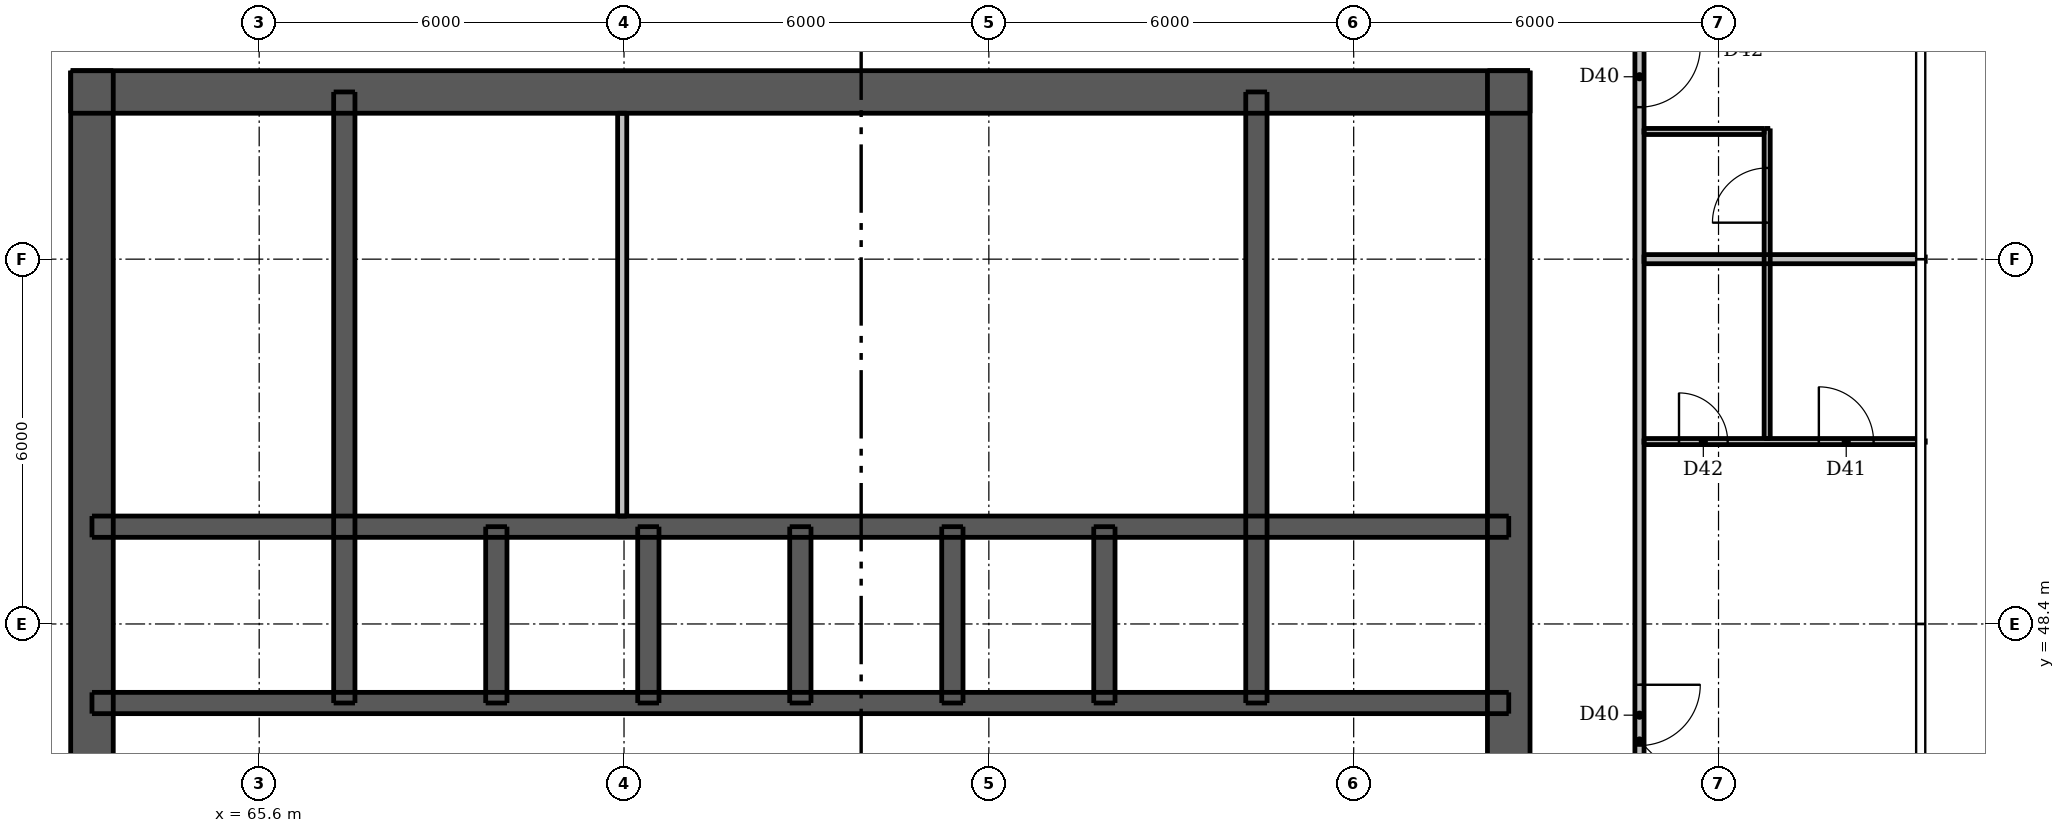
"""IFC4 building model, lengths in metres.
Left out: names, types, materials, properties, quantities, classifications, styles, units other than length and angle.
Written with IfcOpenShell. Run it as: python <this file> out.ifc"""

import sys

from ifc_helpers import new_model, si_unit, direction, frame, frame_2d, origin, place, context, subcontext, project, spatial, rectangle, extrude, element, fill, save


model = new_model("IFC4")
c1 = context("Model", 3, precision=1e-05, world=origin(), true_north=direction((0.0, 1.0)))
c2 = subcontext(c1, "Body", "Model", "MODEL_VIEW")
j1 = project(units=[si_unit("LENGTHUNIT", "METRE"), si_unit("PLANEANGLEUNIT", "RADIAN")], contexts=[c1])
p1 = place(None, origin())
s1 = spatial("IfcSite", under=j1, at=p1, CompositionType="ELEMENT")
p2 = place(p1, origin())
s2 = spatial("IfcBuilding", under=s1, at=p2, CompositionType="ELEMENT")
p3 = place(p2, frame((0.0, 0.0, 168.1)))
s3 = spatial("IfcBuildingStorey", under=s2, at=p3, CompositionType="ELEMENT", Elevation=168.1)
p4 = place(p3, frame((62.5, 57.15, 0.0), z_axis=(0.0, 0.0, 1.0), x_axis=(1.0, 0.0, 0.0)))
e1 = element("IfcWall", 1, at=p4, inside=s3, PredefinedType="SHEAR", context=c2, shape_type="SweptSolid", body=[
    extrude(rectangle(XDim=24.0, YDim=0.7, at=frame_2d((12.0, 0.0))), origin(), (0.0, 0.0, 1.0), 3.05),
])
p5 = place(p4, frame((20.938, 0.0, 0.0)))
e2 = element("IfcOpeningElement", 2, at=p5, cuts=e1, PredefinedType="OPENING", context=c2, shape_type="SweptSolid", body=[
    extrude(rectangle(XDim=1.1, YDim=2.1, at=frame_2d((0.55, 1.05))), frame((0.0, 0.36, 0.0), z_axis=(0.0, -1.0, 0.0), x_axis=(1.0, 0.0, 0.0)), (0.0, 0.0, 1.0), 0.72),
])
p6 = place(p4, frame((1.962, 0.0, 0.0)))
e3 = element("IfcOpeningElement", 3, at=p6, cuts=e1, PredefinedType="OPENING", context=c2, shape_type="SweptSolid", body=[
    extrude(rectangle(XDim=1.1, YDim=2.1, at=frame_2d((0.55, 1.05))), frame((0.0, 0.36, 0.0), z_axis=(0.0, -1.0, 0.0), x_axis=(1.0, 0.0, 0.0)), (0.0, 0.0, 1.0), 0.72),
])
p7 = place(p4, frame((6.423, 0.0, 0.0)))
e4 = element("IfcOpeningElement", 4, at=p7, cuts=e1, PredefinedType="OPENING", context=c2, shape_type="SweptSolid", body=[
    extrude(rectangle(XDim=0.9, YDim=2.1, at=frame_2d((0.45, 1.05))), frame((0.0, 0.36, 0.0), z_axis=(0.0, -1.0, 0.0), x_axis=(1.0, 0.0, 0.0)), (0.0, 0.0, 1.0), 0.72),
])
p8 = place(p4, frame((13.748, 0.0, 0.0)))
e5 = element("IfcOpeningElement", 5, at=p8, cuts=e1, PredefinedType="OPENING", context=c2, shape_type="SweptSolid", body=[
    extrude(rectangle(XDim=0.9, YDim=2.1, at=frame_2d((0.45, 1.05))), frame((0.0, 0.36, 0.0), z_axis=(0.0, -1.0, 0.0), x_axis=(1.0, 0.0, 0.0)), (0.0, 0.0, 1.0), 0.72),
])
p9 = place(p3, frame((62.85, 33.5, 0.0), z_axis=(0.0, 0.0, 1.0), x_axis=(0.0, 1.0, 0.0)))
e6 = element("IfcWall", 6, at=p9, inside=s3, PredefinedType="SHEAR", context=c2, shape_type="SweptSolid", body=[
    extrude(rectangle(XDim=24.0, YDim=0.7, at=frame_2d((12.0, 0.0))), origin(), (0.0, 0.0, 1.0), 3.05),
])
p10 = place(p9, frame((11.2, 0.0, 0.0)))
e7 = element("IfcOpeningElement", 7, at=p10, cuts=e6, PredefinedType="OPENING", context=c2, shape_type="SweptSolid", body=[
    extrude(rectangle(XDim=1.6, YDim=2.1, at=frame_2d((0.8, 1.05))), frame((0.0, 0.36, 0.0), z_axis=(0.0, -1.0, 0.0), x_axis=(1.0, 0.0, 0.0)), (0.0, 0.0, 1.0), 0.72),
])
p11 = place(p3, frame((86.15, 33.5, 0.0), z_axis=(0.0, 0.0, 1.0), x_axis=(0.0, 1.0, 0.0)))
e8 = element("IfcWall", 8, at=p11, inside=s3, PredefinedType="SHEAR", context=c2, shape_type="SweptSolid", body=[
    extrude(rectangle(XDim=24.0, YDim=0.7, at=frame_2d((12.0, 0.0))), origin(), (0.0, 0.0, 1.0), 3.05),
])
p12 = place(p11, frame((11.2, 0.0, 0.0)))
e9 = element("IfcOpeningElement", 9, at=p12, cuts=e8, PredefinedType="OPENING", context=c2, shape_type="SweptSolid", body=[
    extrude(rectangle(XDim=1.6, YDim=2.1, at=frame_2d((0.8, 1.05))), frame((0.0, 0.36, 0.0), z_axis=(0.0, -1.0, 0.0), x_axis=(1.0, 0.0, 0.0)), (0.0, 0.0, 1.0), 0.72),
])
p13 = place(p3, frame((62.85, 47.1, 0.0), z_axis=(0.0, 0.0, 1.0), x_axis=(1.0, 0.0, 0.0)))
e10 = element("IfcWall", 10, at=p13, inside=s3, PredefinedType="SHEAR", context=c2, shape_type="SweptSolid", body=[
    extrude(rectangle(XDim=23.3, YDim=0.35, at=frame_2d((11.65, 0.0))), origin(), (0.0, 0.0, 1.0), 3.05),
])
p14 = place(p13, frame((1.712, 0.0, 0.0)))
e11 = element("IfcOpeningElement", 11, at=p14, cuts=e10, PredefinedType="OPENING", context=c2, shape_type="SweptSolid", body=[
    extrude(rectangle(XDim=0.9, YDim=2.1, at=frame_2d((0.45, 1.05))), frame((0.0, 0.185, 0.0), z_axis=(0.0, -1.0, 0.0), x_axis=(1.0, 0.0, 0.0)), (0.0, 0.0, 1.0), 0.37),
])
p15 = place(p13, frame((20.688, 0.0, 0.0)))
e12 = element("IfcOpeningElement", 12, at=p15, cuts=e10, PredefinedType="OPENING", context=c2, shape_type="SweptSolid", body=[
    extrude(rectangle(XDim=0.9, YDim=2.1, at=frame_2d((0.45, 1.05))), frame((0.0, 0.185, 0.0), z_axis=(0.0, -1.0, 0.0), x_axis=(1.0, 0.0, 0.0)), (0.0, 0.0, 1.0), 0.37),
])
p16 = place(p13, frame((4.85, 0.0, 0.0)))
e13 = element("IfcOpeningElement", 13, at=p16, cuts=e10, PredefinedType="OPENING", context=c2, shape_type="SweptSolid", body=[
    extrude(rectangle(XDim=1.1, YDim=2.1, at=frame_2d((0.55, 1.05))), frame((0.0, 0.185, 0.0), z_axis=(0.0, -1.0, 0.0), x_axis=(1.0, 0.0, 0.0)), (0.0, 0.0, 1.0), 0.37),
])
p17 = place(p13, frame((7.35, 0.0, 0.0)))
e14 = element("IfcOpeningElement", 14, at=p17, cuts=e10, PredefinedType="OPENING", context=c2, shape_type="SweptSolid", body=[
    extrude(rectangle(XDim=1.1, YDim=2.1, at=frame_2d((0.55, 1.05))), frame((0.0, 0.185, 0.0), z_axis=(0.0, -1.0, 0.0), x_axis=(1.0, 0.0, 0.0)), (0.0, 0.0, 1.0), 0.37),
])
p18 = place(p13, frame((9.85, 0.0, 0.0)))
e15 = element("IfcOpeningElement", 15, at=p18, cuts=e10, PredefinedType="OPENING", context=c2, shape_type="SweptSolid", body=[
    extrude(rectangle(XDim=1.1, YDim=2.1, at=frame_2d((0.55, 1.05))), frame((0.0, 0.185, 0.0), z_axis=(0.0, -1.0, 0.0), x_axis=(1.0, 0.0, 0.0)), (0.0, 0.0, 1.0), 0.37),
])
p19 = place(p13, frame((12.35, 0.0, 0.0)))
e16 = element("IfcOpeningElement", 16, at=p19, cuts=e10, PredefinedType="OPENING", context=c2, shape_type="SweptSolid", body=[
    extrude(rectangle(XDim=1.1, YDim=2.1, at=frame_2d((0.55, 1.05))), frame((0.0, 0.185, 0.0), z_axis=(0.0, -1.0, 0.0), x_axis=(1.0, 0.0, 0.0)), (0.0, 0.0, 1.0), 0.37),
])
p20 = place(p13, frame((14.85, 0.0, 0.0)))
e17 = element("IfcOpeningElement", 17, at=p20, cuts=e10, PredefinedType="OPENING", context=c2, shape_type="SweptSolid", body=[
    extrude(rectangle(XDim=1.1, YDim=2.1, at=frame_2d((0.55, 1.05))), frame((0.0, 0.185, 0.0), z_axis=(0.0, -1.0, 0.0), x_axis=(1.0, 0.0, 0.0)), (0.0, 0.0, 1.0), 0.37),
])
p21 = place(p13, frame((17.35, 0.0, 0.0)))
e18 = element("IfcOpeningElement", 18, at=p21, cuts=e10, PredefinedType="OPENING", context=c2, shape_type="SweptSolid", body=[
    extrude(rectangle(XDim=1.1, YDim=2.1, at=frame_2d((0.55, 1.05))), frame((0.0, 0.185, 0.0), z_axis=(0.0, -1.0, 0.0), x_axis=(1.0, 0.0, 0.0)), (0.0, 0.0, 1.0), 0.37),
])
p22 = place(p3, frame((62.85, 50.0, 0.0), z_axis=(0.0, 0.0, 1.0), x_axis=(1.0, 0.0, 0.0)))
e19 = element("IfcWall", 19, at=p22, inside=s3, PredefinedType="SHEAR", context=c2, shape_type="SweptSolid", body=[
    extrude(rectangle(XDim=23.3, YDim=0.35, at=frame_2d((11.65, 0.0))), origin(), (0.0, 0.0, 1.0), 3.05),
])
for number, where, z_axis, x_axis in (
    (20, (67.0, 47.1, 0.0), (0.0, 0.0, 1.0), (0.0, 1.0, 0.0)),
    (21, (82.0, 47.1, 0.0), (0.0, 0.0, 1.0), (0.0, 1.0, 0.0)),
):
    element("IfcWall", number, at=place(p3, frame(where, z_axis=z_axis, x_axis=x_axis)), inside=s3, PredefinedType="SHEAR", context=c2, shape_type="SweptSolid", body=[
        extrude(rectangle(XDim=10.05, YDim=0.35, at=frame_2d((5.025, 0.0))), origin(), (0.0, 0.0, 1.0), 3.05),
    ])
for number, where, z_axis, x_axis in (
    (22, (69.5, 47.1, 0.0), (0.0, 0.0, 1.0), (0.0, 1.0, 0.0)),
    (23, (72.0, 47.1, 0.0), (0.0, 0.0, 1.0), (0.0, 1.0, 0.0)),
    (24, (74.5, 47.1, 0.0), (0.0, 0.0, 1.0), (0.0, 1.0, 0.0)),
    (25, (77.0, 47.1, 0.0), (0.0, 0.0, 1.0), (0.0, 1.0, 0.0)),
    (26, (79.5, 47.1, 0.0), (0.0, 0.0, 1.0), (0.0, 1.0, 0.0)),
):
    element("IfcWall", number, at=place(p3, frame(where, z_axis=z_axis, x_axis=x_axis)), inside=s3, PredefinedType="SHEAR", context=c2, shape_type="SweptSolid", body=[
        extrude(rectangle(XDim=2.9, YDim=0.35, at=frame_2d((1.45, 0.0))), origin(), (0.0, 0.0, 1.0), 3.05),
    ])
p23 = place(p3, frame((71.57, 50.175, 0.0), z_axis=(0.0, 0.0, 1.0), x_axis=(0.0, 1.0, 0.0)))
e27 = element("IfcWall", 27, at=p23, inside=s3, PredefinedType="PLUMBINGWALL", context=c2, shape_type="SweptSolid", body=[
    extrude(rectangle(XDim=6.625, YDim=0.15, at=frame_2d((3.312, 0.0))), origin(), (0.0, 0.0, 1.0), 3.05),
])
p24 = place(p3, frame((90.4, 51.45, 0.0), z_axis=(0.0, 0.0, 1.0), x_axis=(0.0, 1.0, 0.0)))
e28 = element("IfcWall", 28, at=p24, inside=s3, PredefinedType="PARTITIONING", context=c2, shape_type="SweptSolid", body=[
    extrude(rectangle(XDim=5.1, YDim=0.1, at=frame_2d((2.55, 0.0))), origin(), (0.0, 0.0, 1.0), 3.05),
])
p25 = place(p24, frame((3.55, 0.0, 0.0)))
e29 = element("IfcOpeningElement", 29, at=p25, cuts=e28, PredefinedType="OPENING", context=c2, shape_type="SweptSolid", body=[
    extrude(rectangle(XDim=0.9, YDim=2.1, at=frame_2d((0.45, 1.05))), frame((0.0, 0.06, 0.0), z_axis=(0.0, -1.0, 0.0), x_axis=(1.0, 0.0, 0.0)), (0.0, 0.0, 1.0), 0.12),
])
p26 = place(p3, frame((88.375, 56.5, 0.0), z_axis=(0.0, 0.0, 1.0), x_axis=(1.0, 0.0, 0.0)))
e30 = element("IfcWall", 30, at=p26, inside=s3, PredefinedType="PARTITIONING", context=c2, shape_type="SweptSolid", body=[
    extrude(rectangle(XDim=1.975, YDim=0.1, at=frame_2d((0.988, 0.0))), origin(), (0.0, 0.0, 1.0), 3.05),
])
p27 = place(p3, frame((88.375, 51.4, 0.0), z_axis=(0.0, 0.0, 1.0), x_axis=(1.0, 0.0, 0.0)))
e31 = element("IfcWall", 31, at=p27, inside=s3, PredefinedType="PARTITIONING", context=c2, shape_type="SweptSolid", body=[
    extrude(rectangle(XDim=4.625, YDim=0.1, at=frame_2d((2.312, 0.0))), origin(), (0.0, 0.0, 1.0), 3.05),
])
p28 = place(p27, frame((2.875, 0.0, 0.0)))
e32 = element("IfcOpeningElement", 32, at=p28, cuts=e31, PredefinedType="OPENING", context=c2, shape_type="SweptSolid", body=[
    extrude(rectangle(XDim=0.9, YDim=2.1, at=frame_2d((0.45, 1.05))), frame((0.0, 0.06, 0.0), z_axis=(0.0, -1.0, 0.0), x_axis=(1.0, 0.0, 0.0)), (0.0, 0.0, 1.0), 0.12),
])
p29 = place(p27, frame((0.575, 0.0, 0.0)))
e33 = element("IfcOpeningElement", 33, at=p29, cuts=e31, PredefinedType="OPENING", context=c2, shape_type="SweptSolid", body=[
    extrude(rectangle(XDim=0.8, YDim=2.1, at=frame_2d((0.4, 1.05))), frame((0.0, 0.06, 0.0), z_axis=(0.0, -1.0, 0.0), x_axis=(1.0, 0.0, 0.0)), (0.0, 0.0, 1.0), 0.12),
])
p30 = place(p3, frame((88.3, 61.175, 0.0), z_axis=(0.0, 0.0, 1.0), x_axis=(0.0, -1.0, 0.0)))
e34 = element("IfcWall", 34, at=p30, inside=s3, PredefinedType="PARTITIONING", context=c2, shape_type="SweptSolid", body=[
    extrude(rectangle(XDim=29.4, YDim=0.15, at=frame_2d((14.7, 0.0))), origin(), (0.0, 0.0, 1.0), 3.05),
])
p31 = place(p30, frame((28.125, 0.0, 0.0)))
e35 = element("IfcOpeningElement", 35, at=p31, cuts=e34, PredefinedType="OPENING", context=c2, shape_type="SweptSolid", body=[
    extrude(rectangle(XDim=1.0, YDim=2.1, at=frame_2d((0.5, 1.05))), frame((0.0, 0.085, 0.0), z_axis=(0.0, -1.0, 0.0), x_axis=(1.0, 0.0, 0.0)), (0.0, 0.0, 1.0), 0.17),
])
p32 = place(p30, frame((13.775, 0.0, 0.0)))
e36 = element("IfcOpeningElement", 36, at=p32, cuts=e34, PredefinedType="OPENING", context=c2, shape_type="SweptSolid", body=[
    extrude(rectangle(XDim=1.0, YDim=2.1, at=frame_2d((0.5, 1.05))), frame((0.0, 0.085, 0.0), z_axis=(0.0, -1.0, 0.0), x_axis=(1.0, 0.0, 0.0)), (0.0, 0.0, 1.0), 0.17),
])
p33 = place(p30, frame((3.275, 0.0, 0.0)))
e37 = element("IfcOpeningElement", 37, at=p33, cuts=e34, PredefinedType="OPENING", context=c2, shape_type="SweptSolid", body=[
    extrude(rectangle(XDim=1.0, YDim=2.1, at=frame_2d((0.5, 1.05))), frame((0.0, 0.085, 0.0), z_axis=(0.0, -1.0, 0.0), x_axis=(1.0, 0.0, 0.0)), (0.0, 0.0, 1.0), 0.17),
])
p34 = place(p3, frame((88.375, 54.4, 0.0), z_axis=(0.0, 0.0, 1.0), x_axis=(1.0, 0.0, 0.0)))
e38 = element("IfcWall", 38, at=p34, inside=s3, PredefinedType="PARTITIONING", context=c2, shape_type="SweptSolid", body=[
    extrude(rectangle(XDim=4.625, YDim=0.15, at=frame_2d((2.312, 0.0))), origin(), (0.0, 0.0, 1.0), 2.516),
])
p35 = place(p5, origin())
e39 = element("IfcDoor", 39, at=p35, inside=s3, OperationType="SINGLE_SWING_RIGHT", PredefinedType="DOOR", context=c2, shape_type="SweptSolid", body=[
    extrude(rectangle(XDim=1.1, YDim=2.1, at=frame_2d((0.55, 1.05))), frame((0.0, -0.288, 0.0), z_axis=(0.0, -1.0, 0.0), x_axis=(1.0, 0.0, 0.0)), (0.0, 0.0, 1.0), 0.05),
])
fill(e2, e39)
p36 = place(p6, origin())
e40 = element("IfcDoor", 40, at=p36, inside=s3, OperationType="SINGLE_SWING_LEFT", PredefinedType="DOOR", context=c2, shape_type="SweptSolid", body=[
    extrude(rectangle(XDim=1.1, YDim=2.1, at=frame_2d((0.55, 1.05))), frame((0.0, -0.288, 0.0), z_axis=(0.0, -1.0, 0.0), x_axis=(1.0, 0.0, 0.0)), (0.0, 0.0, 1.0), 0.05),
])
fill(e3, e40)
p37 = place(p10, origin())
e41 = element("IfcDoor", 41, at=p37, inside=s3, OperationType="DOUBLE_DOOR_SINGLE_SWING", PredefinedType="DOOR", context=c2, shape_type="SweptSolid", body=[
    extrude(rectangle(XDim=1.6, YDim=2.1, at=frame_2d((0.8, 1.05))), frame((0.0, -0.288, 0.0), z_axis=(0.0, -1.0, 0.0), x_axis=(1.0, 0.0, 0.0)), (0.0, 0.0, 1.0), 0.05),
])
fill(e7, e41)
p38 = place(p12, origin())
e42 = element("IfcDoor", 42, at=p38, inside=s3, OperationType="DOUBLE_DOOR_SINGLE_SWING", PredefinedType="DOOR", context=c2, shape_type="SweptSolid", body=[
    extrude(rectangle(XDim=1.6, YDim=2.1, at=frame_2d((0.8, 1.05))), frame((0.0, 0.337, 0.0), z_axis=(0.0, -1.0, 0.0), x_axis=(1.0, 0.0, 0.0)), (0.0, 0.0, 1.0), 0.05),
])
fill(e9, e42)
p39 = place(p14, origin())
e43 = element("IfcDoor", 43, at=p39, inside=s3, OperationType="SINGLE_SWING_LEFT", PredefinedType="DOOR", context=c2, shape_type="SweptSolid", body=[
    extrude(rectangle(XDim=0.9, YDim=2.1, at=frame_2d((0.45, 1.05))), frame((0.0, 0.163, 0.0), z_axis=(0.0, -1.0, 0.0), x_axis=(1.0, 0.0, 0.0)), (0.0, 0.0, 1.0), 0.05),
])
fill(e11, e43)
p40 = place(p15, origin())
e44 = element("IfcDoor", 44, at=p40, inside=s3, OperationType="SINGLE_SWING_LEFT", PredefinedType="DOOR", context=c2, shape_type="SweptSolid", body=[
    extrude(rectangle(XDim=0.9, YDim=2.1, at=frame_2d((0.45, 1.05))), frame((0.0, 0.163, 0.0), z_axis=(0.0, -1.0, 0.0), x_axis=(1.0, 0.0, 0.0)), (0.0, 0.0, 1.0), 0.05),
])
fill(e12, e44)
p41 = place(p7, origin())
e45 = element("IfcDoor", 45, at=p41, inside=s3, OperationType="SINGLE_SWING_RIGHT", PredefinedType="DOOR", context=c2, shape_type="SweptSolid", body=[
    extrude(rectangle(XDim=0.9, YDim=2.1, at=frame_2d((0.45, 1.05))), frame((0.0, -0.288, 0.0), z_axis=(0.0, -1.0, 0.0), x_axis=(1.0, 0.0, 0.0)), (0.0, 0.0, 1.0), 0.05),
])
fill(e4, e45)
p42 = place(p8, origin())
e46 = element("IfcDoor", 46, at=p42, inside=s3, OperationType="SINGLE_SWING_RIGHT", PredefinedType="DOOR", context=c2, shape_type="SweptSolid", body=[
    extrude(rectangle(XDim=0.9, YDim=2.1, at=frame_2d((0.45, 1.05))), frame((0.0, -0.288, 0.0), z_axis=(0.0, -1.0, 0.0), x_axis=(1.0, 0.0, 0.0)), (0.0, 0.0, 1.0), 0.05),
])
fill(e5, e46)
p43 = place(p16, origin())
e47 = element("IfcDoor", 47, at=p43, inside=s3, OperationType="DOUBLE_DOOR_SLIDING", PredefinedType="DOOR", context=c2, shape_type="SweptSolid", body=[
    extrude(rectangle(XDim=1.1, YDim=2.1, at=frame_2d((0.55, 1.05))), frame((0.0, 0.025, 0.0), z_axis=(0.0, -1.0, 0.0), x_axis=(1.0, 0.0, 0.0)), (0.0, 0.0, 1.0), 0.05),
])
fill(e13, e47)
p44 = place(p17, origin())
e48 = element("IfcDoor", 48, at=p44, inside=s3, OperationType="DOUBLE_DOOR_SLIDING", PredefinedType="DOOR", context=c2, shape_type="SweptSolid", body=[
    extrude(rectangle(XDim=1.1, YDim=2.1, at=frame_2d((0.55, 1.05))), frame((0.0, 0.025, 0.0), z_axis=(0.0, -1.0, 0.0), x_axis=(1.0, 0.0, 0.0)), (0.0, 0.0, 1.0), 0.05),
])
fill(e14, e48)
p45 = place(p18, origin())
e49 = element("IfcDoor", 49, at=p45, inside=s3, OperationType="DOUBLE_DOOR_SLIDING", PredefinedType="DOOR", context=c2, shape_type="SweptSolid", body=[
    extrude(rectangle(XDim=1.1, YDim=2.1, at=frame_2d((0.55, 1.05))), frame((0.0, 0.025, 0.0), z_axis=(0.0, -1.0, 0.0), x_axis=(1.0, 0.0, 0.0)), (0.0, 0.0, 1.0), 0.05),
])
fill(e15, e49)
p46 = place(p19, origin())
e50 = element("IfcDoor", 50, at=p46, inside=s3, OperationType="DOUBLE_DOOR_SLIDING", PredefinedType="DOOR", context=c2, shape_type="SweptSolid", body=[
    extrude(rectangle(XDim=1.1, YDim=2.1, at=frame_2d((0.55, 1.05))), frame((0.0, 0.025, 0.0), z_axis=(0.0, -1.0, 0.0), x_axis=(1.0, 0.0, 0.0)), (0.0, 0.0, 1.0), 0.05),
])
fill(e16, e50)
p47 = place(p20, origin())
e51 = element("IfcDoor", 51, at=p47, inside=s3, OperationType="DOUBLE_DOOR_SLIDING", PredefinedType="DOOR", context=c2, shape_type="SweptSolid", body=[
    extrude(rectangle(XDim=1.1, YDim=2.1, at=frame_2d((0.55, 1.05))), frame((0.0, 0.025, 0.0), z_axis=(0.0, -1.0, 0.0), x_axis=(1.0, 0.0, 0.0)), (0.0, 0.0, 1.0), 0.05),
])
fill(e17, e51)
p48 = place(p21, origin())
e52 = element("IfcDoor", 52, at=p48, inside=s3, OperationType="DOUBLE_DOOR_SLIDING", PredefinedType="DOOR", context=c2, shape_type="SweptSolid", body=[
    extrude(rectangle(XDim=1.1, YDim=2.1, at=frame_2d((0.55, 1.05))), frame((0.0, 0.025, 0.0), z_axis=(0.0, -1.0, 0.0), x_axis=(1.0, 0.0, 0.0)), (0.0, 0.0, 1.0), 0.05),
])
fill(e18, e52)
p49 = place(p32, origin())
e53 = element("IfcDoor", 53, at=p49, inside=s3, OperationType="SINGLE_SWING_LEFT", PredefinedType="DOOR", context=c2, shape_type="SweptSolid", body=[
    extrude(rectangle(XDim=1.0, YDim=2.1, at=frame_2d((0.5, 1.05))), frame((0.0, 0.025, 0.0), z_axis=(0.0, -1.0, 0.0), x_axis=(1.0, 0.0, 0.0)), (0.0, 0.0, 1.0), 0.05),
])
fill(e36, e53)
p50 = place(p28, origin())
e54 = element("IfcDoor", 54, at=p50, inside=s3, OperationType="SINGLE_SWING_LEFT", PredefinedType="DOOR", context=c2, shape_type="SweptSolid", body=[
    extrude(rectangle(XDim=0.9, YDim=2.1, at=frame_2d((0.45, 1.05))), frame((0.0, 0.025, 0.0), z_axis=(0.0, -1.0, 0.0), x_axis=(1.0, 0.0, 0.0)), (0.0, 0.0, 1.0), 0.05),
])
fill(e32, e54)
p51 = place(p29, origin())
e55 = element("IfcDoor", 55, at=p51, inside=s3, OperationType="SINGLE_SWING_LEFT", PredefinedType="DOOR", context=c2, shape_type="SweptSolid", body=[
    extrude(rectangle(XDim=0.8, YDim=2.1, at=frame_2d((0.4, 1.05))), frame((0.0, 0.025, 0.0), z_axis=(0.0, -1.0, 0.0), x_axis=(1.0, 0.0, 0.0)), (0.0, 0.0, 1.0), 0.05),
])
fill(e33, e55)
p52 = place(p33, origin())
e56 = element("IfcDoor", 56, at=p52, inside=s3, OperationType="SINGLE_SWING_LEFT", PredefinedType="DOOR", context=c2, shape_type="SweptSolid", body=[
    extrude(rectangle(XDim=1.0, YDim=2.1, at=frame_2d((0.5, 1.05))), frame((0.0, 0.025, 0.0), z_axis=(0.0, -1.0, 0.0), x_axis=(1.0, 0.0, 0.0)), (0.0, 0.0, 1.0), 0.05),
])
fill(e37, e56)
p53 = place(p25, origin())
e57 = element("IfcDoor", 57, at=p53, inside=s3, OperationType="SINGLE_SWING_LEFT", PredefinedType="DOOR", context=c2, shape_type="SweptSolid", body=[
    extrude(rectangle(XDim=0.9, YDim=2.1, at=frame_2d((0.45, 1.05))), frame((0.0, 0.025, 0.0), z_axis=(0.0, -1.0, 0.0), x_axis=(1.0, 0.0, 0.0)), (0.0, 0.0, 1.0), 0.05),
])
fill(e29, e57)
save(model, sys.argv[1])
